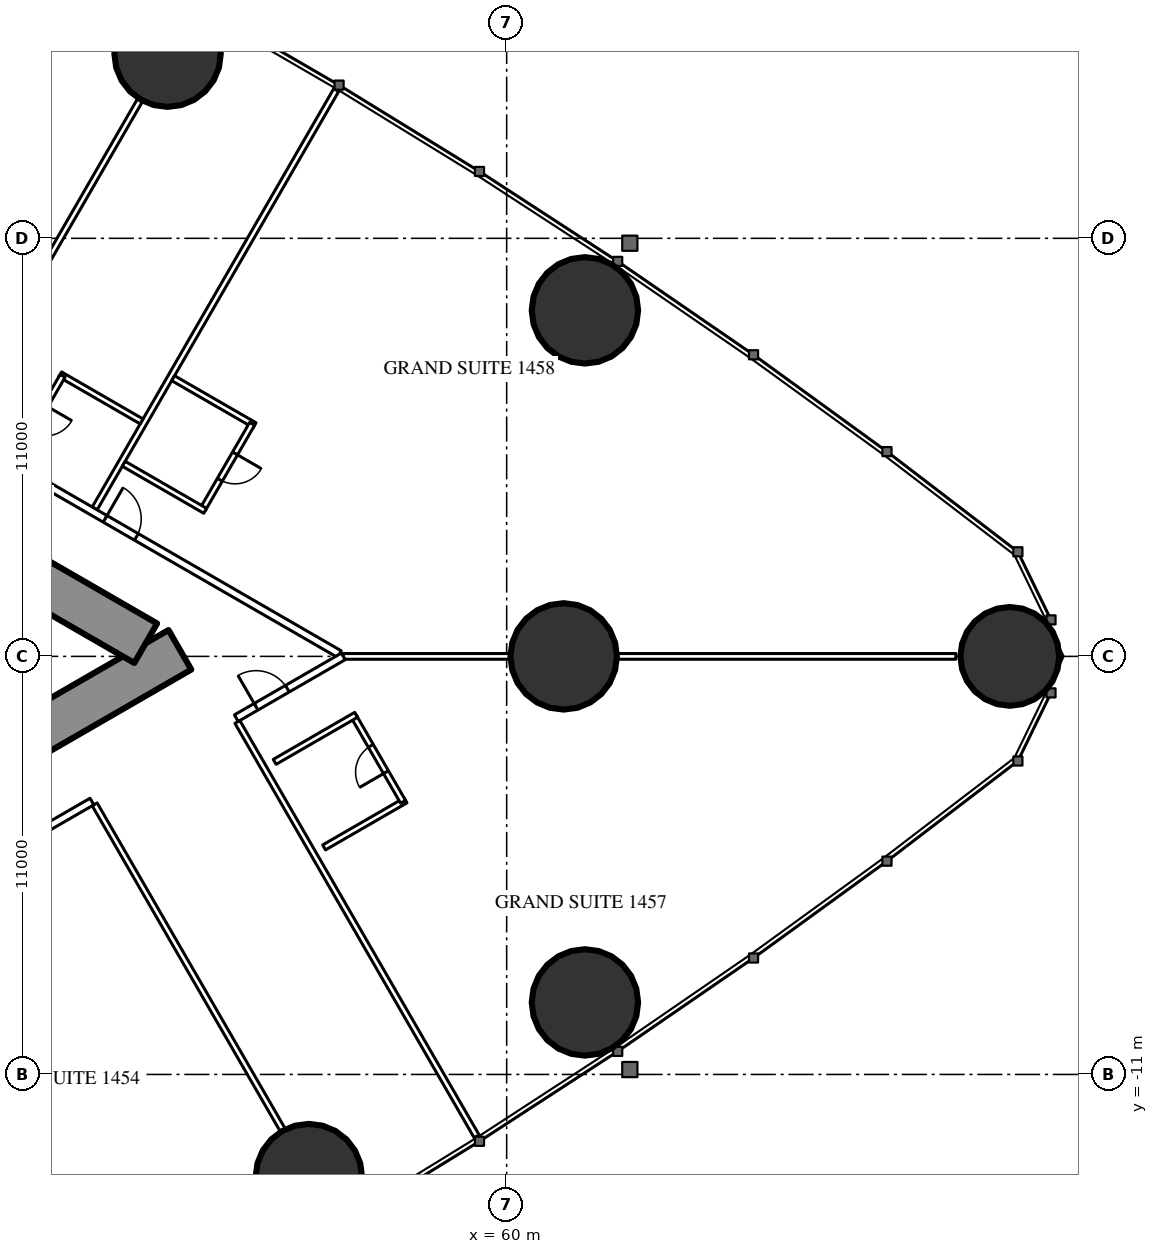
"""IFC4 building model, lengths in metres.
Left out: names, types, materials, properties, quantities, classifications, styles, units other than length and angle.
Written with IfcOpenShell. Run it as: python <this file> out.ifc"""

import sys

from ifc_helpers import new_model, si_unit, direction, frame, frame_2d, origin, origin_2d, place, context, subcontext, project, spatial, rectangle, hollow_circle, extrude, element, fill, save


model = new_model("IFC4")
c1 = context("Model", 3, precision=1e-05, world=origin(), true_north=direction((0.0, 1.0)))
c2 = subcontext(c1, "Body", "Model", "MODEL_VIEW")
j1 = project(units=[si_unit("LENGTHUNIT", "METRE"), si_unit("PLANEANGLEUNIT", "RADIAN")], contexts=[c1])
p1 = place(None, origin())
s1 = spatial("IfcSite", under=j1, at=p1, CompositionType="ELEMENT")
p2 = place(p1, origin())
s2 = spatial("IfcBuilding", under=s1, at=p2, CompositionType="ELEMENT")
p3 = place(p2, frame((0.0, 0.0, 56.5)))
s3 = spatial("IfcBuildingStorey", under=s2, at=p3, CompositionType="ELEMENT", Elevation=56.5)
p4 = place(p3, frame((73.239, 0.0, 0.0), z_axis=(0.0, 0.0, 1.0), x_axis=(1.0, 0.0, 0.0)))
e1 = element("IfcColumn", 1, at=p4, inside=s3, PredefinedType="COLUMN", context=c2, shape_type="SweptSolid", body=[
    extrude(hollow_circle(Radius=1.3, WallThickness=0.1, at=origin_2d()), origin(), (0.0, 0.0, 1.0), 3.5),
])
for number, where, z_axis, x_axis in (
    (2, (62.059, 9.105, 0.0), (0.0, 0.0, 1.0), (1.0, 0.0, 0.0)),
    (3, (51.078, 15.858, 0.0), (0.0, 0.0, 1.0), (1.0, 0.0, 0.0)),
    (4, (54.795, -13.701, 0.0), (0.0, 0.0, 1.0), (1.0, 0.0, 0.0)),
    (5, (62.059, -9.105, 0.0), (0.0, 0.0, 1.0), (1.0, 0.0, 0.0)),
):
    element("IfcColumn", number, at=place(p3, frame(where, z_axis=z_axis, x_axis=x_axis)), inside=s3, PredefinedType="COLUMN", context=c2, shape_type="SweptSolid", body=[
        extrude(hollow_circle(Radius=1.4, WallThickness=0.12, at=origin_2d()), origin(), (0.0, 0.0, 1.0), 3.5),
    ])
p5 = place(p3, frame((61.5, 0.0, 0.0), z_axis=(0.0, 0.0, 1.0), x_axis=(1.0, 0.0, 0.0)))
e6 = element("IfcColumn", 6, at=p5, inside=s3, PredefinedType="COLUMN", context=c2, shape_type="SweptSolid", body=[
    extrude(hollow_circle(Radius=1.4, WallThickness=0.1, at=origin_2d()), origin(), (0.0, 0.0, 1.0), 3.5),
])
p6 = place(p3, frame((27.2, -13.8, 0.0), z_axis=(0.0, 0.0, 1.0), x_axis=(0.866027159892, 0.499996958321, 0.0)))
e7 = element("IfcWall", 7, at=p6, inside=s3, PredefinedType="SHEAR", context=c2, shape_type="SweptSolid", body=[
    extrude(rectangle(XDim=27.947, YDim=1.2, at=frame_2d((13.973, 0.0))), origin(), (0.0, 0.0, 1.0), 3.5),
])
p7 = place(p6, frame((4.6, 0.0, 0.0)))
e8 = element("IfcOpeningElement", 8, at=p7, cuts=e7, PredefinedType="OPENING", context=c2, shape_type="SweptSolid", body=[
    extrude(rectangle(XDim=1.0, YDim=2.2, at=frame_2d((0.5, 1.1))), frame((0.0, 0.61, 0.0), z_axis=(0.0, -1.0, 0.0), x_axis=(1.0, 0.0, 0.0)), (0.0, 0.0, 1.0), 1.22),
])
p8 = place(p6, frame((13.395, 0.0, 0.0)))
e9 = element("IfcOpeningElement", 9, at=p8, cuts=e7, PredefinedType="OPENING", context=c2, shape_type="SweptSolid", body=[
    extrude(rectangle(XDim=1.8, YDim=2.2, at=frame_2d((0.9, 1.1))), frame((0.0, 0.61, 0.0), z_axis=(0.0, -1.0, 0.0), x_axis=(1.0, 0.0, 0.0)), (0.0, 0.0, 1.0), 1.22),
])
p9 = place(p3, frame((27.2, 13.8, 0.0), z_axis=(0.0, 0.0, 1.0), x_axis=(0.866024515034, -0.500001539357, 0.0)))
e10 = element("IfcWall", 10, at=p9, inside=s3, PredefinedType="SHEAR", context=c2, shape_type="SweptSolid", body=[
    extrude(rectangle(XDim=26.907, YDim=1.2, at=frame_2d((13.454, 0.0))), origin(), (0.0, 0.0, 1.0), 3.5),
])
p10 = place(p9, frame((4.6, 0.0, 0.0)))
e11 = element("IfcOpeningElement", 11, at=p10, cuts=e10, PredefinedType="OPENING", context=c2, shape_type="SweptSolid", body=[
    extrude(rectangle(XDim=1.0, YDim=2.2, at=frame_2d((0.5, 1.1))), frame((0.0, 0.61, 0.0), z_axis=(0.0, -1.0, 0.0), x_axis=(1.0, 0.0, 0.0)), (0.0, 0.0, 1.0), 1.22),
])
p11 = place(p9, frame((13.395, 0.0, 0.0)))
e12 = element("IfcOpeningElement", 12, at=p11, cuts=e10, PredefinedType="OPENING", context=c2, shape_type="SweptSolid", body=[
    extrude(rectangle(XDim=1.8, YDim=2.2, at=frame_2d((0.9, 1.1))), frame((0.0, 0.61, 0.0), z_axis=(0.0, -1.0, 0.0), x_axis=(1.0, 0.0, 0.0)), (0.0, 0.0, 1.0), 1.22),
])
p12 = place(p3, frame((49.159, -3.893, 0.0), z_axis=(0.0, 0.0, 1.0), x_axis=(0.499998773722, -0.866026111775, 0.0)))
e13 = element("IfcWall", 13, at=p12, inside=s3, PredefinedType="PARTITIONING", context=c2, shape_type="SweptSolid", body=[
    extrude(rectangle(XDim=9.892, YDim=0.15, at=frame_2d((4.946, 0.0))), origin(), (0.0, 0.0, 1.0), 2.25),
])
p13 = place(p3, frame((52.915, -1.725, 0.0), z_axis=(0.0, 0.0, 1.0), x_axis=(0.499997163113, -0.866027041656, 0.0)))
e14 = element("IfcWall", 14, at=p13, inside=s3, PredefinedType="PARTITIONING", context=c2, shape_type="SweptSolid", body=[
    extrude(rectangle(XDim=12.591, YDim=0.15, at=frame_2d((6.295, 0.0))), origin(), (0.0, 0.0, 1.0), 3.25),
])
p14 = place(p3, frame((45.403, 6.062, 0.0), z_axis=(0.0, 0.0, 1.0), x_axis=(0.500013434677, 0.866017647131, 0.0)))
e15 = element("IfcWall", 15, at=p14, inside=s3, PredefinedType="PARTITIONING", context=c2, shape_type="SweptSolid", body=[
    extrude(rectangle(XDim=9.902, YDim=0.15, at=frame_2d((4.951, 0.0))), origin(), (0.0, 0.0, 1.0), 2.25),
])
p15 = place(p3, frame((49.159, 3.893, 0.0), z_axis=(0.0, 0.0, 1.0), x_axis=(0.499995664361, 0.866027906952, 0.0)))
e16 = element("IfcWall", 16, at=p15, inside=s3, PredefinedType="PARTITIONING", context=c2, shape_type="SweptSolid", body=[
    extrude(rectangle(XDim=12.711, YDim=0.15, at=frame_2d((6.356, 0.0))), origin(), (0.0, 0.0, 1.0), 3.25),
])
p16 = place(p3, frame((55.702, 0.0, 0.0), z_axis=(0.0, 0.0, 1.0), x_axis=(1.0, 0.0, 0.0)))
e17 = element("IfcWall", 17, at=p16, inside=s3, PredefinedType="PARTITIONING", context=c2, shape_type="SweptSolid", body=[
    extrude(rectangle(XDim=16.117, YDim=0.15, at=frame_2d((8.059, 0.0))), origin(), (0.0, 0.0, 1.0), 2.25),
])
p17 = place(p3, frame((36.834, 10.894, 0.0), z_axis=(0.0, 0.0, 1.0), x_axis=(0.866028157229, -0.499995230863, 0.0)))
e18 = element("IfcWall", 18, at=p17, inside=s3, PredefinedType="PARTITIONING", context=c2, shape_type="SweptSolid", body=[
    extrude(rectangle(XDim=21.667, YDim=0.2, at=frame_2d((10.833, 0.0))), origin(), (0.0, 0.0, 1.0), 3.25),
])
p18 = place(p17, frame((14.55, 0.0, 0.0)))
e19 = element("IfcOpeningElement", 19, at=p18, cuts=e18, PredefinedType="OPENING", context=c2, shape_type="SweptSolid", body=[
    extrude(rectangle(XDim=0.95, YDim=2.2, at=frame_2d((0.475, 1.1))), frame((0.0, 0.11, 0.0), z_axis=(0.0, -1.0, 0.0), x_axis=(1.0, 0.0, 0.0)), (0.0, 0.0, 1.0), 0.22),
])
p19 = place(p17, frame((10.5, 0.0, 0.0)))
e20 = element("IfcOpeningElement", 20, at=p19, cuts=e18, PredefinedType="OPENING", context=c2, shape_type="SweptSolid", body=[
    extrude(rectangle(XDim=0.95, YDim=2.2, at=frame_2d((0.475, 1.1))), frame((0.0, 0.11, 0.0), z_axis=(0.0, -1.0, 0.0), x_axis=(1.0, 0.0, 0.0)), (0.0, 0.0, 1.0), 0.22),
])
p20 = place(p17, frame((4.292, 0.0, 0.0)))
e21 = element("IfcOpeningElement", 21, at=p20, cuts=e18, PredefinedType="OPENING", context=c2, shape_type="SweptSolid", body=[
    extrude(rectangle(XDim=1.0, YDim=2.2, at=frame_2d((0.5, 1.1))), frame((0.0, 0.11, 0.0), z_axis=(0.0, -1.0, 0.0), x_axis=(1.0, 0.0, 0.0)), (0.0, 0.0, 1.0), 0.22),
])
p21 = place(p17, frame((0.246, 0.0, 0.0)))
e22 = element("IfcOpeningElement", 22, at=p21, cuts=e18, PredefinedType="OPENING", context=c2, shape_type="SweptSolid", body=[
    extrude(rectangle(XDim=0.9, YDim=2.2, at=frame_2d((0.45, 1.1))), frame((0.0, 0.11, 0.0), z_axis=(0.0, -1.0, 0.0), x_axis=(1.0, 0.0, 0.0)), (0.0, 0.0, 1.0), 0.22),
])
p22 = place(p3, frame((37.96, -10.243, 0.0), z_axis=(0.0, 0.0, 1.0), x_axis=(0.866030548046, 0.499991089772, 0.0)))
e23 = element("IfcWall", 23, at=p22, inside=s3, PredefinedType="PARTITIONING", context=c2, shape_type="SweptSolid", body=[
    extrude(rectangle(XDim=12.849, YDim=0.2, at=frame_2d((6.425, 0.0))), origin(), (0.0, 0.0, 1.0), 3.25),
])
p23 = place(p22, frame((4.575, 0.0, 0.0)))
e24 = element("IfcOpeningElement", 24, at=p23, cuts=e23, PredefinedType="OPENING", context=c2, shape_type="SweptSolid", body=[
    extrude(rectangle(XDim=0.95, YDim=2.2, at=frame_2d((0.475, 1.1))), frame((0.0, 0.11, 0.0), z_axis=(0.0, -1.0, 0.0), x_axis=(1.0, 0.0, 0.0)), (0.0, 0.0, 1.0), 0.22),
])
p24 = place(p22, frame((0.6, 0.0, 0.0)))
e25 = element("IfcOpeningElement", 25, at=p24, cuts=e23, PredefinedType="OPENING", context=c2, shape_type="SweptSolid", body=[
    extrude(rectangle(XDim=0.95, YDim=2.2, at=frame_2d((0.475, 1.1))), frame((0.0, 0.11, 0.0), z_axis=(0.0, -1.0, 0.0), x_axis=(1.0, 0.0, 0.0)), (0.0, 0.0, 1.0), 0.22),
])
p25 = place(p3, frame((52.886, -1.626, 0.0), z_axis=(0.0, 0.0, 1.0), x_axis=(0.866030540913, 0.499991102127, 0.0)))
e26 = element("IfcWall", 26, at=p25, inside=s3, PredefinedType="PARTITIONING", context=c2, shape_type="SweptSolid", body=[
    extrude(rectangle(XDim=3.251, YDim=0.2, at=frame_2d((1.626, 0.0))), origin(), (0.0, 0.0, 1.0), 3.25),
])
p26 = place(p25, frame((0.6, 0.0, 0.0)))
e27 = element("IfcOpeningElement", 27, at=p26, cuts=e26, PredefinedType="OPENING", context=c2, shape_type="SweptSolid", body=[
    extrude(rectangle(XDim=0.95, YDim=2.2, at=frame_2d((0.475, 1.1))), frame((0.0, 0.11, 0.0), z_axis=(0.0, -1.0, 0.0), x_axis=(1.0, 0.0, 0.0)), (0.0, 0.0, 1.0), 0.22),
])
p27 = place(p3, frame((55.196, -5.026, 0.0), z_axis=(0.0, 0.0, 1.0), x_axis=(0.866073894602, 0.499916002032, 0.0)))
e28 = element("IfcWall", 28, at=p27, inside=s3, PredefinedType="PARTITIONING", context=c2, shape_type="SweptSolid", body=[
    extrude(rectangle(XDim=2.475, YDim=0.15, at=frame_2d((1.238, 0.0))), origin(), (0.0, 0.0, 1.0), 3.25),
])
p28 = place(p3, frame((55.975, -1.575, 0.0), z_axis=(0.0, 0.0, 1.0), x_axis=(0.500006934395, -0.866021400173, 0.0)))
e29 = element("IfcWall", 29, at=p28, inside=s3, PredefinedType="PARTITIONING", context=c2, shape_type="SweptSolid", body=[
    extrude(rectangle(XDim=2.6, YDim=0.15, at=frame_2d((1.3, 0.0))), origin(), (0.0, 0.0, 1.0), 3.25),
])
p29 = place(p28, frame((0.9, 0.0, 0.0)))
e30 = element("IfcOpeningElement", 30, at=p29, cuts=e29, PredefinedType="OPENING", context=c2, shape_type="SweptSolid", body=[
    extrude(rectangle(XDim=0.8, YDim=2.2, at=frame_2d((0.4, 1.1))), frame((0.0, 0.085, 0.0), z_axis=(0.0, -1.0, 0.0), x_axis=(1.0, 0.0, 0.0)), (0.0, 0.0, 1.0), 0.17),
])
p30 = place(p3, frame((53.896, -2.775, 0.0), z_axis=(0.0, 0.0, 1.0), x_axis=(0.866006523861, 0.500032699561, 0.0)))
e31 = element("IfcWall", 31, at=p30, inside=s3, PredefinedType="PARTITIONING", context=c2, shape_type="SweptSolid", body=[
    extrude(rectangle(XDim=2.475, YDim=0.15, at=frame_2d((1.237, 0.0))), origin(), (0.0, 0.0, 1.0), 3.25),
])
p31 = place(p3, frame((51.224, 7.32, 0.0), z_axis=(0.0, 0.0, 1.0), x_axis=(0.866031185235, -0.4999899861, 0.0)))
e32 = element("IfcWall", 32, at=p31, inside=s3, PredefinedType="PARTITIONING", context=c2, shape_type="SweptSolid", body=[
    extrude(rectangle(XDim=2.475, YDim=0.15, at=frame_2d((1.238, 0.0))), origin(), (0.0, 0.0, 1.0), 3.25),
])
p32 = place(p3, frame((52.003, 3.868, 0.0), z_axis=(0.0, 0.0, 1.0), x_axis=(0.500047596559, 0.865997922154, 0.0)))
e33 = element("IfcWall", 33, at=p32, inside=s3, PredefinedType="PARTITIONING", context=c2, shape_type="SweptSolid", body=[
    extrude(rectangle(XDim=2.6, YDim=0.15, at=frame_2d((1.3, 0.0))), origin(), (0.0, 0.0, 1.0), 3.25),
])
p33 = place(p32, frame((0.9, 0.0, 0.0)))
e34 = element("IfcOpeningElement", 34, at=p33, cuts=e33, PredefinedType="OPENING", context=c2, shape_type="SweptSolid", body=[
    extrude(rectangle(XDim=0.8, YDim=2.2, at=frame_2d((0.4, 1.1))), frame((0.0, 0.085, 0.0), z_axis=(0.0, -1.0, 0.0), x_axis=(1.0, 0.0, 0.0)), (0.0, 0.0, 1.0), 0.17),
])
for number, where, z_axis, x_axis in (
    (35, (49.925, 5.068, 0.0), (0.0, 0.0, 1.0), (0.866, -0.5, 0.0)),
    (36, (48.251, 7.42, 0.0), (0.0, 0.0, 1.0), (0.866, -0.5, 0.0)),
):
    element("IfcWall", number, at=place(p3, frame(where, z_axis=z_axis, x_axis=x_axis)), inside=s3, PredefinedType="PARTITIONING", context=c2, shape_type="SweptSolid", body=[
        extrude(rectangle(XDim=2.475, YDim=0.15, at=frame_2d((1.237, 0.0))), origin(), (0.0, 0.0, 1.0), 3.25),
    ])
p34 = place(p3, frame((47.016, 5.13, 0.0), z_axis=(0.0, 0.0, 1.0), x_axis=(0.500006934395, 0.866021400173, 0.0)))
e37 = element("IfcWall", 37, at=p34, inside=s3, PredefinedType="PARTITIONING", context=c2, shape_type="SweptSolid", body=[
    extrude(rectangle(XDim=2.6, YDim=0.15, at=frame_2d((1.3, 0.0))), origin(), (0.0, 0.0, 1.0), 3.25),
])
p35 = place(p34, frame((0.9, 0.0, 0.0)))
e38 = element("IfcOpeningElement", 38, at=p35, cuts=e37, PredefinedType="OPENING", context=c2, shape_type="SweptSolid", body=[
    extrude(rectangle(XDim=0.8, YDim=2.2, at=frame_2d((0.4, 1.1))), frame((0.0, 0.085, 0.0), z_axis=(0.0, -1.0, 0.0), x_axis=(1.0, 0.0, 0.0)), (0.0, 0.0, 1.0), 0.17),
])
p36 = place(p29, origin())
e39 = element("IfcDoor", 39, at=p36, inside=s3, OperationType="SINGLE_SWING_RIGHT", PredefinedType="DOOR", context=c2, shape_type="SweptSolid", body=[
    extrude(rectangle(XDim=0.8, YDim=2.2, at=frame_2d((0.4, 1.1))), frame((0.0, 0.025, 0.0), z_axis=(0.0, -1.0, 0.0), x_axis=(1.0, 0.0, 0.0)), (0.0, 0.0, 1.0), 0.05),
])
fill(e30, e39)
p37 = place(p26, origin())
e40 = element("IfcDoor", 40, at=p37, inside=s3, OperationType="SINGLE_SWING_LEFT", PredefinedType="DOOR", context=c2, shape_type="SweptSolid", body=[
    extrude(rectangle(XDim=0.95, YDim=2.2, at=frame_2d((0.475, 1.1))), frame((0.0, 0.025, 0.0), z_axis=(0.0, -1.0, 0.0), x_axis=(1.0, 0.0, 0.0)), (0.0, 0.0, 1.0), 0.05),
])
fill(e27, e40)
p38 = place(p33, origin())
e41 = element("IfcDoor", 41, at=p38, inside=s3, OperationType="SINGLE_SWING_RIGHT", PredefinedType="DOOR", context=c2, shape_type="SweptSolid", body=[
    extrude(rectangle(XDim=0.8, YDim=2.2, at=frame_2d((0.4, 1.1))), frame((0.0, 0.025, 0.0), z_axis=(0.0, -1.0, 0.0), x_axis=(1.0, 0.0, 0.0)), (0.0, 0.0, 1.0), 0.05),
])
fill(e34, e41)
p39 = place(p18, origin())
e42 = element("IfcDoor", 42, at=p39, inside=s3, OperationType="SINGLE_SWING_LEFT", PredefinedType="DOOR", context=c2, shape_type="SweptSolid", body=[
    extrude(rectangle(XDim=0.95, YDim=2.2, at=frame_2d((0.475, 1.1))), frame((0.0, 0.025, 0.0), z_axis=(0.0, -1.0, 0.0), x_axis=(1.0, 0.0, 0.0)), (0.0, 0.0, 1.0), 0.05),
])
fill(e19, e42)
save(model, sys.argv[1])
